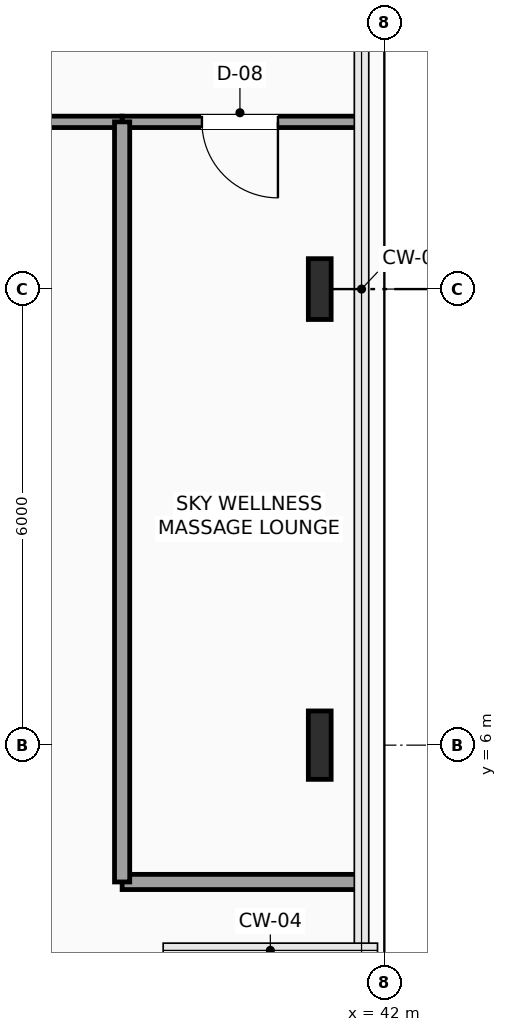
"""IFC4 building model, lengths in metres.
Left out: names, types, materials, properties, quantities, classifications, styles, units other than length and angle.
Written with IfcOpenShell. Run it as: python <this file> out.ifc"""

import sys

from ifc_helpers import new_model, si_unit, direction, frame, frame_2d, origin, origin_2d, place, context, subcontext, project, spatial, rectangle, i_section, extrude, element, fill, save


model = new_model("IFC4")
c1 = context("Model", 3, precision=1e-05, world=origin(), true_north=direction((0.0, 1.0)))
c2 = subcontext(c1, "Body", "Model", "MODEL_VIEW")
j1 = project(units=[si_unit("LENGTHUNIT", "METRE"), si_unit("PLANEANGLEUNIT", "RADIAN")], contexts=[c1])
p1 = place(None, origin())
s1 = spatial("IfcSite", under=j1, at=p1, CompositionType="ELEMENT")
p2 = place(p1, origin())
s2 = spatial("IfcBuilding", under=s1, at=p2, CompositionType="ELEMENT")
p3 = place(p2, frame((0.0, 0.0, 231.15)))
s3 = spatial("IfcBuildingStorey", under=s2, at=p3, CompositionType="ELEMENT", Elevation=231.15)
p4 = place(p3, frame((41.15, 6.0, 0.0), z_axis=(0.0, 0.0, 1.0), x_axis=(1.0, 0.0, 0.0)))
e1 = element("IfcColumn", 1, at=p4, inside=s3, PredefinedType="COLUMN", context=c2, shape_type="SweptSolid", body=[
    extrude(i_section(OverallWidth=0.3, OverallDepth=0.9, WebThickness=0.019, FlangeThickness=0.035, FilletRadius=0.03, at=origin_2d()), origin(), (0.0, 0.0, 1.0), 3.75),
])
p5 = place(p3, frame((41.15, 12.0, 0.0), z_axis=(0.0, 0.0, 1.0), x_axis=(1.0, 0.0, 0.0)))
e2 = element("IfcColumn", 2, at=p5, inside=s3, PredefinedType="COLUMN", context=c2, shape_type="SweptSolid", body=[
    extrude(i_section(OverallWidth=0.3, OverallDepth=0.8, WebThickness=0.018, FlangeThickness=0.033, FilletRadius=0.03, at=origin_2d()), origin(), (0.0, 0.0, 1.0), 3.75),
])
p6 = place(p3, frame((41.7, 14.2, 0.0), z_axis=(0.0, 0.0, 1.0), x_axis=(-1.0, 0.0, 0.0)))
e3 = element("IfcWall", 3, at=p6, inside=s3, PredefinedType="PARTITIONING", context=c2, shape_type="SweptSolid", body=[
    extrude(rectangle(XDim=3.15, YDim=0.15, at=frame_2d((1.575, 0.0))), origin(), (0.0, 0.0, 1.0), 3.425),
])
p7 = place(p6, frame((1.1, 0.0, 0.0)))
e4 = element("IfcOpeningElement", 4, at=p7, cuts=e3, PredefinedType="OPENING", context=c2, shape_type="SweptSolid", body=[
    extrude(rectangle(XDim=1.0, YDim=2.2, at=frame_2d((0.5, 1.1))), frame((0.0, 0.085, 0.0), z_axis=(0.0, -1.0, 0.0), x_axis=(1.0, 0.0, 0.0)), (0.0, 0.0, 1.0), 0.17),
])
p8 = place(p3, frame((38.55, 14.2, 0.0), z_axis=(0.0, 0.0, 1.0), x_axis=(-1.0, 0.0, 0.0)))
e5 = element("IfcWall", 5, at=p8, inside=s3, PredefinedType="PARTITIONING", context=c2, shape_type="SweptSolid", body=[
    extrude(rectangle(XDim=2.4, YDim=0.15, at=frame_2d((1.2, 0.0))), origin(), (0.0, 0.0, 1.0), 3.425),
])
p9 = place(p3, frame((38.55, 4.2, 0.0), z_axis=(0.0, 0.0, 1.0), x_axis=(1.0, 0.0, 0.0)))
e6 = element("IfcWall", 6, at=p9, inside=s3, PredefinedType="PARTITIONING", context=c2, shape_type="SweptSolid", body=[
    extrude(rectangle(XDim=3.15, YDim=0.2, at=frame_2d((1.575, 0.0))), origin(), (0.0, 0.0, 1.0), 3.425),
])
p10 = place(p3, frame((38.55, 4.2, 0.0), z_axis=(0.0, 0.0, 1.0), x_axis=(0.0, 1.0, 0.0)))
e7 = element("IfcWall", 7, at=p10, inside=s3, PredefinedType="PARTITIONING", context=c2, shape_type="SweptSolid", body=[
    extrude(rectangle(XDim=10.0, YDim=0.2, at=frame_2d((5.0, 0.0))), origin(), (0.0, 0.0, 1.0), 3.425),
])
p11 = place(p7, origin())
e8 = element("IfcDoor", 8, at=p11, inside=s3, OperationType="SINGLE_SWING_LEFT", PredefinedType="DOOR", context=c2, shape_type="SweptSolid", body=[
    extrude(rectangle(XDim=1.0, YDim=2.2, at=frame_2d((0.5, 1.1))), frame((0.0, 0.025, 0.0), z_axis=(0.0, -1.0, 0.0), x_axis=(1.0, 0.0, 0.0)), (0.0, 0.0, 1.0), 0.05),
])
fill(e4, e8)
save(model, sys.argv[1])
